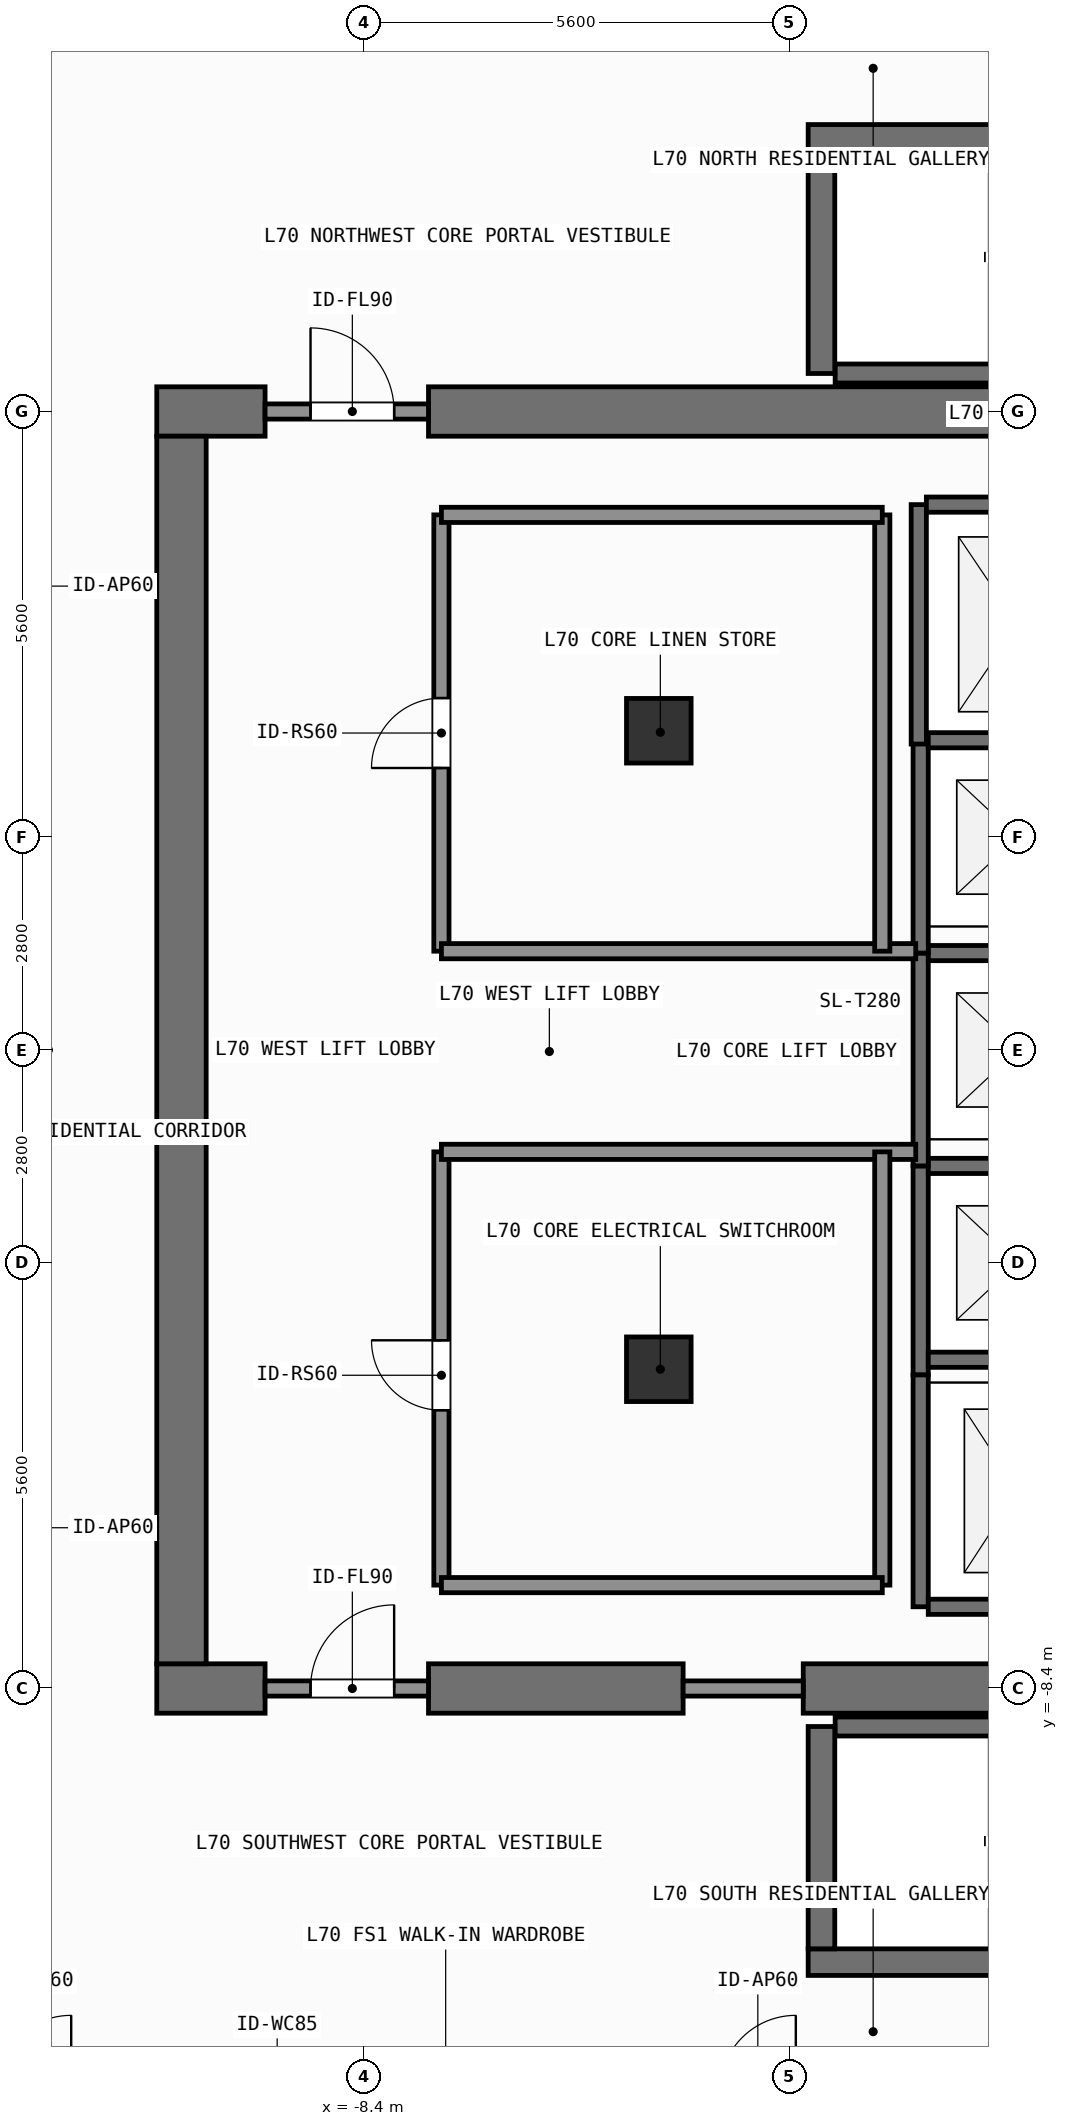
"""IFC4 building model, lengths in metres.
Left out: names, types, materials, properties, quantities, classifications, styles, units other than length and angle.
Written with IfcOpenShell. Run it as: python <this file> out.ifc"""

import sys

from ifc_helpers import new_model, si_unit, direction, frame, frame_2d, origin, origin_2d, place, context, subcontext, project, spatial, rectangle, extrude, element, fill, save


model = new_model("IFC4")
c1 = context("Model", 3, precision=1e-05, world=origin(), true_north=direction((0.0, 1.0)))
c2 = subcontext(c1, "Body", "Model", "MODEL_VIEW")
j1 = project(units=[si_unit("LENGTHUNIT", "METRE"), si_unit("PLANEANGLEUNIT", "RADIAN")], contexts=[c1])
p1 = place(None, origin())
s1 = spatial("IfcSite", under=j1, at=p1, CompositionType="ELEMENT")
p2 = place(p1, origin())
s2 = spatial("IfcBuilding", under=s1, at=p2, CompositionType="ELEMENT")
p3 = place(p2, frame((0.0, 0.0, 285.9)))
s3 = spatial("IfcBuildingStorey", under=s2, at=p3, CompositionType="ELEMENT", Elevation=285.9)
p4 = place(p3, frame((-11.125, -8.4, 0.0), z_axis=(0.0, 0.0, 1.0), x_axis=(1.0, 0.0, 0.0)))
e1 = element("IfcWall", 1, at=p4, inside=s3, PredefinedType="SHEAR", context=c2, shape_type="SweptSolid", body=[
    extrude(rectangle(XDim=1.425, YDim=0.65, at=frame_2d((0.712, 0.0))), origin(), (0.0, 0.0, 1.0), 3.9),
])
p5 = place(p3, frame((-7.55, -8.4, 0.0), z_axis=(0.0, 0.0, 1.0), x_axis=(1.0, 0.0, 0.0)))
e2 = element("IfcWall", 2, at=p5, inside=s3, PredefinedType="SHEAR", context=c2, shape_type="SweptSolid", body=[
    extrude(rectangle(XDim=3.35, YDim=0.65, at=frame_2d((1.675, 0.0))), origin(), (0.0, 0.0, 1.0), 3.9),
])
p6 = place(p3, frame((-2.62, -8.4, 0.0), z_axis=(0.0, 0.0, 1.0), x_axis=(1.0, 0.0, 0.0)))
e3 = element("IfcWall", 3, at=p6, inside=s3, PredefinedType="SHEAR", context=c2, shape_type="SweptSolid", body=[
    extrude(rectangle(XDim=7.27, YDim=0.65, at=frame_2d((3.635, 0.0))), origin(), (0.0, 0.0, 1.0), 3.9),
])
p7 = place(p3, frame((-11.125, 8.4, 0.0), z_axis=(0.0, 0.0, 1.0), x_axis=(1.0, 0.0, 0.0)))
e4 = element("IfcWall", 4, at=p7, inside=s3, PredefinedType="SHEAR", context=c2, shape_type="SweptSolid", body=[
    extrude(rectangle(XDim=1.425, YDim=0.65, at=frame_2d((0.712, 0.0))), origin(), (0.0, 0.0, 1.0), 3.9),
])
p8 = place(p3, frame((-7.55, 8.4, 0.0), z_axis=(0.0, 0.0, 1.0), x_axis=(1.0, 0.0, 0.0)))
e5 = element("IfcWall", 5, at=p8, inside=s3, PredefinedType="SHEAR", context=c2, shape_type="SweptSolid", body=[
    extrude(rectangle(XDim=16.275, YDim=0.65, at=frame_2d((8.138, 0.0))), origin(), (0.0, 0.0, 1.0), 3.9),
])
p9 = place(p3, frame((-10.8, -8.075, 0.0), z_axis=(0.0, 0.0, 1.0), x_axis=(0.0, 1.0, 0.0)))
e6 = element("IfcWall", 6, at=p9, inside=s3, PredefinedType="SHEAR", context=c2, shape_type="SweptSolid", body=[
    extrude(rectangle(XDim=16.15, YDim=0.65, at=frame_2d((8.075, 0.0))), origin(), (0.0, 0.0, 1.0), 3.9),
])
p10 = place(p3, frame((-2.555, -12.0, 0.0), z_axis=(0.0, 0.0, 1.0), x_axis=(1.0, 0.0, 0.0)))
e7 = element("IfcWall", 7, at=p10, inside=s3, PredefinedType="SHEAR", context=c2, shape_type="SweptSolid", body=[
    extrude(rectangle(XDim=7.31, YDim=0.35, at=frame_2d((3.655, 0.0))), origin(), (0.0, 0.0, 1.0), 3.9),
])
p11 = place(p3, frame((-2.2, -8.9, 0.0), z_axis=(0.0, 0.0, 1.0), x_axis=(1.0, 0.0, 0.0)))
e8 = element("IfcWall", 8, at=p11, inside=s3, PredefinedType="SHEAR", context=c2, shape_type="SweptSolid", body=[
    extrude(rectangle(XDim=6.6, YDim=0.25, at=frame_2d((3.3, 0.0))), origin(), (0.0, 0.0, 1.0), 3.9),
])
p12 = place(p3, frame((-2.38, -11.825, 0.0), z_axis=(0.0, 0.0, 1.0), x_axis=(0.0, 1.0, 0.0)))
e9 = element("IfcWall", 9, at=p12, inside=s3, PredefinedType="SHEAR", context=c2, shape_type="SweptSolid", body=[
    extrude(rectangle(XDim=2.925, YDim=0.35, at=frame_2d((1.462, 0.0))), origin(), (0.0, 0.0, 1.0), 3.9),
])
p13 = place(p3, frame((-2.555, 12.0, 0.0), z_axis=(0.0, 0.0, 1.0), x_axis=(1.0, 0.0, 0.0)))
e10 = element("IfcWall", 10, at=p13, inside=s3, PredefinedType="SHEAR", context=c2, shape_type="SweptSolid", body=[
    extrude(rectangle(XDim=7.31, YDim=0.35, at=frame_2d((3.655, 0.0))), origin(), (0.0, 0.0, 1.0), 3.9),
])
p14 = place(p3, frame((-2.2, 8.9, 0.0), z_axis=(0.0, 0.0, 1.0), x_axis=(1.0, 0.0, 0.0)))
e11 = element("IfcWall", 11, at=p14, inside=s3, PredefinedType="SHEAR", context=c2, shape_type="SweptSolid", body=[
    extrude(rectangle(XDim=6.6, YDim=0.25, at=frame_2d((3.3, 0.0))), origin(), (0.0, 0.0, 1.0), 3.9),
])
p15 = place(p3, frame((-2.38, 8.9, 0.0), z_axis=(0.0, 0.0, 1.0), x_axis=(0.0, 1.0, 0.0)))
e12 = element("IfcWall", 12, at=p15, inside=s3, PredefinedType="SHEAR", context=c2, shape_type="SweptSolid", body=[
    extrude(rectangle(XDim=2.925, YDim=0.35, at=frame_2d((1.462, 0.0))), origin(), (0.0, 0.0, 1.0), 3.9),
])
for number, where, z_axis, x_axis in (
    (13, (-4.52, -4.2, 0.0), (0.0, 0.0, 1.0), (1.0, 0.0, 0.0)),
    (14, (-4.52, 4.2, 0.0), (0.0, 0.0, 1.0), (1.0, 0.0, 0.0)),
):
    element("IfcColumn", number, at=place(p3, frame(where, z_axis=z_axis, x_axis=x_axis)), inside=s3, PredefinedType="COLUMN", context=c2, shape_type="SweptSolid", body=[
        extrude(rectangle(XDim=0.85, YDim=0.85, at=origin_2d()), origin(), (0.0, 0.0, 1.0), 3.9),
    ])
p16 = place(p3, frame((-1.075, -4.275, 0.0), z_axis=(0.0, 0.0, 1.0), x_axis=(0.0, 1.0, 0.0)))
e15 = element("IfcWall", 15, at=p16, inside=s3, PredefinedType="SHEAR", context=c2, shape_type="SweptSolid", body=[
    extrude(rectangle(XDim=2.75, YDim=0.2, at=frame_2d((1.375, 0.0))), origin(), (0.0, 0.0, 1.0), 3.68),
])
for number, where, z_axis, x_axis in (
    (16, (-0.975, -4.075, 0.0), (0.0, 0.0, 1.0), (1.0, 0.0, 0.0)),
    (17, (-0.975, -1.525, 0.0), (0.0, 0.0, 1.0), (1.0, 0.0, 0.0)),
):
    element("IfcWall", number, at=place(p3, frame(where, z_axis=z_axis, x_axis=x_axis)), inside=s3, PredefinedType="SHEAR", context=c2, shape_type="SweptSolid", body=[
        extrude(rectangle(XDim=2.35, YDim=0.2, at=frame_2d((1.175, 0.0))), origin(), (0.0, 0.0, 1.0), 3.68),
    ])
p17 = place(p3, frame((-1.075, -1.525, 0.0), z_axis=(0.0, 0.0, 1.0), x_axis=(0.0, 1.0, 0.0)))
e18 = element("IfcWall", 18, at=p17, inside=s3, PredefinedType="SHEAR", context=c2, shape_type="SweptSolid", body=[
    extrude(rectangle(XDim=2.8, YDim=0.2, at=frame_2d((1.4, 0.0))), origin(), (0.0, 0.0, 1.0), 3.68),
])
p18 = place(p3, frame((-0.975, 1.275, 0.0), z_axis=(0.0, 0.0, 1.0), x_axis=(1.0, 0.0, 0.0)))
e19 = element("IfcWall", 19, at=p18, inside=s3, PredefinedType="SHEAR", context=c2, shape_type="SweptSolid", body=[
    extrude(rectangle(XDim=2.35, YDim=0.2, at=frame_2d((1.175, 0.0))), origin(), (0.0, 0.0, 1.0), 3.68),
])
p19 = place(p3, frame((-1.075, 1.275, 0.0), z_axis=(0.0, 0.0, 1.0), x_axis=(0.0, 1.0, 0.0)))
e20 = element("IfcWall", 20, at=p19, inside=s3, PredefinedType="SHEAR", context=c2, shape_type="SweptSolid", body=[
    extrude(rectangle(XDim=2.8, YDim=0.2, at=frame_2d((1.4, 0.0))), origin(), (0.0, 0.0, 1.0), 3.68),
])
p20 = place(p3, frame((-0.975, 4.075, 0.0), z_axis=(0.0, 0.0, 1.0), x_axis=(1.0, 0.0, 0.0)))
e21 = element("IfcWall", 21, at=p20, inside=s3, PredefinedType="SHEAR", context=c2, shape_type="SweptSolid", body=[
    extrude(rectangle(XDim=2.35, YDim=0.2, at=frame_2d((1.175, 0.0))), origin(), (0.0, 0.0, 1.0), 3.68),
])
p21 = place(p3, frame((-1.1, 4.025, 0.0), z_axis=(0.0, 0.0, 1.0), x_axis=(0.0, 1.0, 0.0)))
e22 = element("IfcWall", 22, at=p21, inside=s3, PredefinedType="SHEAR", context=c2, shape_type="SweptSolid", body=[
    extrude(rectangle(XDim=3.15, YDim=0.2, at=frame_2d((1.575, 0.0))), origin(), (0.0, 0.0, 1.0), 3.68),
])
p22 = place(p3, frame((-1.0, 7.175, 0.0), z_axis=(0.0, 0.0, 1.0), x_axis=(1.0, 0.0, 0.0)))
e23 = element("IfcWall", 23, at=p22, inside=s3, PredefinedType="SHEAR", context=c2, shape_type="SweptSolid", body=[
    extrude(rectangle(XDim=2.4, YDim=0.2, at=frame_2d((1.2, 0.0))), origin(), (0.0, 0.0, 1.0), 3.68),
])
p23 = place(p3, frame((-1.075, -7.325, 0.0), z_axis=(0.0, 0.0, 1.0), x_axis=(0.0, 1.0, 0.0)))
e24 = element("IfcWall", 24, at=p23, inside=s3, PredefinedType="SHEAR", context=c2, shape_type="SweptSolid", body=[
    extrude(rectangle(XDim=3.05, YDim=0.2, at=frame_2d((1.525, 0.0))), origin(), (0.0, 0.0, 1.0), 3.68),
])
p24 = place(p3, frame((-0.975, -7.325, 0.0), z_axis=(0.0, 0.0, 1.0), x_axis=(1.0, 0.0, 0.0)))
e25 = element("IfcWall", 25, at=p24, inside=s3, PredefinedType="SHEAR", context=c2, shape_type="SweptSolid", body=[
    extrude(rectangle(XDim=2.35, YDim=0.2, at=frame_2d((1.175, 0.0))), origin(), (0.0, 0.0, 1.0), 3.68),
])
p25 = place(p3, frame((-9.7, -8.4, 0.0), z_axis=(0.0, 0.0, 1.0), x_axis=(1.0, 0.0, 0.0)))
e26 = element("IfcWall", 26, at=p25, inside=s3, PredefinedType="SOLIDWALL", context=c2, shape_type="SweptSolid", body=[
    extrude(rectangle(XDim=2.15, YDim=0.2, at=frame_2d((1.075, 0.0))), origin(), (0.0, 0.0, 1.0), 2.92),
])
p26 = place(p25, frame((0.598, 0.0, 0.0)))
e27 = element("IfcOpeningElement", 27, at=p26, cuts=e26, PredefinedType="OPENING", context=c2, shape_type="SweptSolid", body=[
    extrude(rectangle(XDim=1.1, YDim=2.15, at=frame_2d((0.55, 1.075))), frame((0.0, 0.11, 0.0), z_axis=(0.0, -1.0, 0.0), x_axis=(1.0, 0.0, 0.0)), (0.0, 0.0, 1.0), 0.22),
])
p27 = place(p3, frame((-9.7, 8.4, 0.0), z_axis=(0.0, 0.0, 1.0), x_axis=(1.0, 0.0, 0.0)))
e28 = element("IfcWall", 28, at=p27, inside=s3, PredefinedType="SOLIDWALL", context=c2, shape_type="SweptSolid", body=[
    extrude(rectangle(XDim=2.15, YDim=0.2, at=frame_2d((1.075, 0.0))), origin(), (0.0, 0.0, 1.0), 2.92),
])
p28 = place(p27, frame((0.598, 0.0, 0.0)))
e29 = element("IfcOpeningElement", 29, at=p28, cuts=e28, PredefinedType="OPENING", context=c2, shape_type="SweptSolid", body=[
    extrude(rectangle(XDim=1.1, YDim=2.15, at=frame_2d((0.55, 1.075))), frame((0.0, 0.11, 0.0), z_axis=(0.0, -1.0, 0.0), x_axis=(1.0, 0.0, 0.0)), (0.0, 0.0, 1.0), 0.22),
])
p29 = place(p3, frame((-7.38, -7.04, 0.0), z_axis=(0.0, 0.0, 1.0), x_axis=(0.0, 1.0, 0.0)))
e30 = element("IfcWall", 30, at=p29, inside=s3, PredefinedType="SOLIDWALL", context=c2, shape_type="SweptSolid", body=[
    extrude(rectangle(XDim=5.7, YDim=0.2, at=frame_2d((2.85, 0.0))), origin(), (0.0, 0.0, 1.0), 3.68),
])
p30 = place(p29, frame((2.301, 0.0, 0.0)))
e31 = element("IfcOpeningElement", 31, at=p30, cuts=e30, PredefinedType="OPENING", context=c2, shape_type="SweptSolid", body=[
    extrude(rectangle(XDim=0.92, YDim=2.1, at=frame_2d((0.46, 1.05))), frame((0.0, 0.11, 0.0), z_axis=(0.0, -1.0, 0.0), x_axis=(1.0, 0.0, 0.0)), (0.0, 0.0, 1.0), 0.22),
])
p31 = place(p3, frame((-7.38, 1.3, 0.0), z_axis=(0.0, 0.0, 1.0), x_axis=(0.0, 1.0, 0.0)))
e32 = element("IfcWall", 32, at=p31, inside=s3, PredefinedType="SOLIDWALL", context=c2, shape_type="SweptSolid", body=[
    extrude(rectangle(XDim=5.74, YDim=0.2, at=frame_2d((2.87, 0.0))), origin(), (0.0, 0.0, 1.0), 3.68),
])
p32 = place(p31, frame((2.41, 0.0, 0.0)))
e33 = element("IfcOpeningElement", 33, at=p32, cuts=e32, PredefinedType="OPENING", context=c2, shape_type="SweptSolid", body=[
    extrude(rectangle(XDim=0.92, YDim=2.1, at=frame_2d((0.46, 1.05))), frame((0.0, 0.11, 0.0), z_axis=(0.0, -1.0, 0.0), x_axis=(1.0, 0.0, 0.0)), (0.0, 0.0, 1.0), 0.22),
])
p33 = place(p3, frame((-4.2, -8.4, 0.0), z_axis=(0.0, 0.0, 1.0), x_axis=(1.0, 0.0, 0.0)))
e34 = element("IfcWall", 34, at=p33, inside=s3, PredefinedType="SOLIDWALL", context=c2, shape_type="SweptSolid", body=[
    extrude(rectangle(XDim=1.58, YDim=0.2, at=frame_2d((0.79, 0.0))), origin(), (0.0, 0.0, 1.0), 2.92),
])
for number, where, z_axis, x_axis in (
    (35, (-7.38, -1.34, 0.0), (0.0, 0.0, 1.0), (1.0, 0.0, 0.0)),
    (36, (-7.38, 1.3, 0.0), (0.0, 0.0, 1.0), (1.0, 0.0, 0.0)),
):
    element("IfcWall", number, at=place(p3, frame(where, z_axis=z_axis, x_axis=x_axis)), inside=s3, PredefinedType="SOLIDWALL", context=c2, shape_type="SweptSolid", body=[
        extrude(rectangle(XDim=6.24, YDim=0.2, at=frame_2d((3.12, 0.0))), origin(), (0.0, 0.0, 1.0), 3.68),
    ])
p34 = place(p3, frame((-1.58, -7.04, 0.0), z_axis=(0.0, 0.0, 1.0), x_axis=(0.0, 1.0, 0.0)))
e37 = element("IfcWall", 37, at=p34, inside=s3, PredefinedType="SOLIDWALL", context=c2, shape_type="SweptSolid", body=[
    extrude(rectangle(XDim=5.7, YDim=0.2, at=frame_2d((2.85, 0.0))), origin(), (0.0, 0.0, 1.0), 3.68),
])
p35 = place(p3, frame((-7.38, -7.04, 0.0), z_axis=(0.0, 0.0, 1.0), x_axis=(1.0, 0.0, 0.0)))
e38 = element("IfcWall", 38, at=p35, inside=s3, PredefinedType="SOLIDWALL", context=c2, shape_type="SweptSolid", body=[
    extrude(rectangle(XDim=5.8, YDim=0.2, at=frame_2d((2.9, 0.0))), origin(), (0.0, 0.0, 1.0), 3.68),
])
p36 = place(p3, frame((-1.58, 1.3, 0.0), z_axis=(0.0, 0.0, 1.0), x_axis=(0.0, 1.0, 0.0)))
e39 = element("IfcWall", 39, at=p36, inside=s3, PredefinedType="SOLIDWALL", context=c2, shape_type="SweptSolid", body=[
    extrude(rectangle(XDim=5.74, YDim=0.2, at=frame_2d((2.87, 0.0))), origin(), (0.0, 0.0, 1.0), 3.68),
])
p37 = place(p3, frame((-7.38, 7.04, 0.0), z_axis=(0.0, 0.0, 1.0), x_axis=(1.0, 0.0, 0.0)))
e40 = element("IfcWall", 40, at=p37, inside=s3, PredefinedType="SOLIDWALL", context=c2, shape_type="SweptSolid", body=[
    extrude(rectangle(XDim=5.8, YDim=0.2, at=frame_2d((2.9, 0.0))), origin(), (0.0, 0.0, 1.0), 3.68),
])
p38 = place(p26, origin())
e41 = element("IfcDoor", 41, at=p38, inside=s3, OperationType="SINGLE_SWING_RIGHT", PredefinedType="DOOR", context=c2, shape_type="SweptSolid", body=[
    extrude(rectangle(XDim=1.1, YDim=2.15, at=frame_2d((0.55, 1.075))), frame((0.0, 0.025, 0.0), z_axis=(0.0, -1.0, 0.0), x_axis=(1.0, 0.0, 0.0)), (0.0, 0.0, 1.0), 0.05),
])
fill(e27, e41)
p39 = place(p28, origin())
e42 = element("IfcDoor", 42, at=p39, inside=s3, OperationType="SINGLE_SWING_LEFT", PredefinedType="DOOR", context=c2, shape_type="SweptSolid", body=[
    extrude(rectangle(XDim=1.1, YDim=2.15, at=frame_2d((0.55, 1.075))), frame((0.0, 0.025, 0.0), z_axis=(0.0, -1.0, 0.0), x_axis=(1.0, 0.0, 0.0)), (0.0, 0.0, 1.0), 0.05),
])
fill(e29, e42)
p40 = place(p30, origin())
e43 = element("IfcDoor", 43, at=p40, inside=s3, OperationType="SINGLE_SWING_RIGHT", PredefinedType="DOOR", context=c2, shape_type="SweptSolid", body=[
    extrude(rectangle(XDim=0.92, YDim=2.1, at=frame_2d((0.46, 1.05))), frame((0.0, 0.025, 0.0), z_axis=(0.0, -1.0, 0.0), x_axis=(1.0, 0.0, 0.0)), (0.0, 0.0, 1.0), 0.05),
])
fill(e31, e43)
p41 = place(p32, origin())
e44 = element("IfcDoor", 44, at=p41, inside=s3, OperationType="SINGLE_SWING_LEFT", PredefinedType="DOOR", context=c2, shape_type="SweptSolid", body=[
    extrude(rectangle(XDim=0.92, YDim=2.1, at=frame_2d((0.46, 1.05))), frame((0.0, 0.025, 0.0), z_axis=(0.0, -1.0, 0.0), x_axis=(1.0, 0.0, 0.0)), (0.0, 0.0, 1.0), 0.05),
])
fill(e33, e44)
save(model, sys.argv[1])
